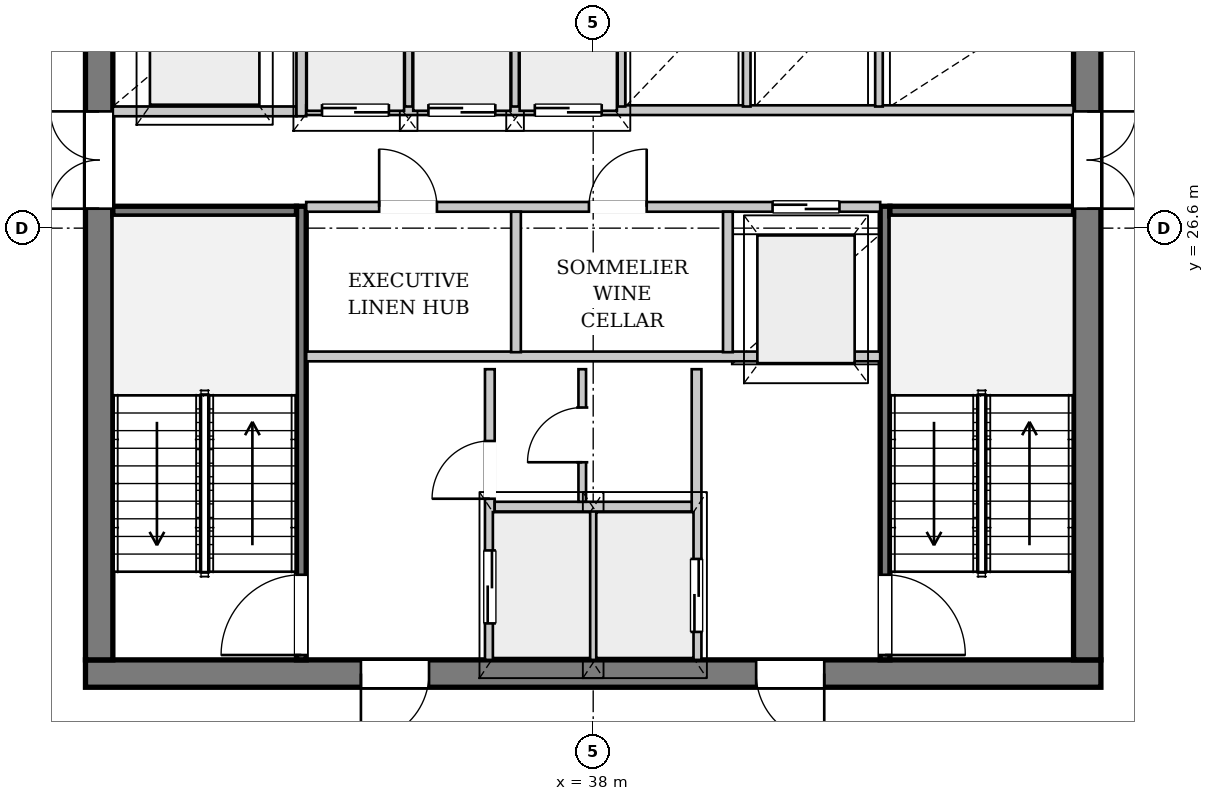
"""IFC4 building model, lengths in metres.
Left out: names, types, materials, properties, quantities, classifications, styles, units other than length and angle.
Written with IfcOpenShell. Run it as: python <this file> out.ifc"""

import sys

from ifc_helpers import new_model, si_unit, direction, frame, frame_2d, origin, place, context, subcontext, project, spatial, rectangle, extrude, source, transform, mapped, element, fill, save


model = new_model("IFC4")
c1 = context("Model", 3, precision=1e-05, world=origin(), true_north=direction((0.0, 1.0)))
c2 = subcontext(c1, "Body", "Model", "MODEL_VIEW")
j1 = project(units=[si_unit("LENGTHUNIT", "METRE"), si_unit("PLANEANGLEUNIT", "RADIAN")], contexts=[c1])
p1 = place(None, origin())
s1 = spatial("IfcSite", under=j1, at=p1, CompositionType="ELEMENT")
p2 = place(p1, origin())
s2 = spatial("IfcBuilding", under=s1, at=p2, CompositionType="ELEMENT")
p3 = place(p2, frame((0.0, 0.0, 230.9)))
s3 = spatial("IfcBuildingStorey", under=s2, at=p3, CompositionType="ELEMENT", Elevation=230.9)
p4 = place(p3, frame((52.708, 24.702, 0.0), z_axis=(0.0, 0.0, 1.0), x_axis=(-0.403169735339, -0.915125217938, 0.0)))
e1 = element("IfcWall", 1, at=p4, inside=s3, PredefinedType="SOLIDWALL", context=c2, shape_type="SweptSolid", body=[
    extrude(rectangle(XDim=22.923, YDim=0.32, at=frame_2d((11.461, 0.0))), origin(), (0.0, 0.0, 1.0), 2.872),
])
p5 = place(p4, frame((7.685, 0.0, 0.0)))
e2 = element("IfcOpeningElement", 2, at=p5, cuts=e1, PredefinedType="OPENING", context=c2, shape_type="SweptSolid", body=[
    extrude(rectangle(XDim=1.5, YDim=2.3, at=frame_2d((0.75, 1.15))), frame((0.0, 0.17, 0.0), z_axis=(0.0, -1.0, 0.0), x_axis=(1.0, 0.0, 0.0)), (0.0, 0.0, 1.0), 0.34),
])
p6 = place(p4, frame((15.663, 0.0, 0.402)))
e3 = element("IfcOpeningElement", 3, at=p6, cuts=e1, PredefinedType="OPENING", context=c2, shape_type="SweptSolid", body=[
    extrude(rectangle(XDim=2.6, YDim=2.35, at=frame_2d((1.3, 1.175))), frame((0.0, 0.17, 0.0), z_axis=(0.0, -1.0, 0.0), x_axis=(1.0, 0.0, 0.0)), (0.0, 0.0, 1.0), 0.34),
])
p7 = place(p3, frame((46.35, 19.275, 0.0), z_axis=(0.0, 0.0, 1.0), x_axis=(-1.0, 0.0, 0.0)))
e4 = element("IfcWall", 4, at=p7, inside=s3, PredefinedType="SHEAR", context=c2, shape_type="SweptSolid", body=[
    extrude(rectangle(XDim=16.7, YDim=0.45, at=frame_2d((8.35, 0.0))), origin(), (0.0, 0.0, 1.0), 3.38),
])
p8 = place(p7, frame((4.55, 0.0, 0.0)))
e5 = element("IfcOpeningElement", 5, at=p8, cuts=e4, PredefinedType="OPENING", context=c2, shape_type="SweptSolid", body=[
    extrude(rectangle(XDim=1.12, YDim=2.25, at=frame_2d((0.56, 1.125))), frame((0.0, 0.235, 0.0), z_axis=(0.0, -1.0, 0.0), x_axis=(1.0, 0.0, 0.0)), (0.0, 0.0, 1.0), 0.47),
])
p9 = place(p7, frame((11.05, 0.0, 0.0)))
e6 = element("IfcOpeningElement", 6, at=p9, cuts=e4, PredefinedType="OPENING", context=c2, shape_type="SweptSolid", body=[
    extrude(rectangle(XDim=1.12, YDim=2.25, at=frame_2d((0.56, 1.125))), frame((0.0, 0.235, 0.0), z_axis=(0.0, -1.0, 0.0), x_axis=(1.0, 0.0, 0.0)), (0.0, 0.0, 1.0), 0.47),
])
p10 = place(p3, frame((29.875, 19.5, 0.0), z_axis=(0.0, 0.0, 1.0), x_axis=(0.0, 1.0, 0.0)))
e7 = element("IfcWall", 7, at=p10, inside=s3, PredefinedType="SHEAR", context=c2, shape_type="SweptSolid", body=[
    extrude(rectangle(XDim=14.2, YDim=0.45, at=frame_2d((7.1, 0.0))), origin(), (0.0, 0.0, 1.0), 3.38),
])
p11 = place(p10, frame((7.42, 0.0, 0.0)))
e8 = element("IfcOpeningElement", 8, at=p11, cuts=e7, PredefinedType="OPENING", context=c2, shape_type="SweptSolid", body=[
    extrude(rectangle(XDim=1.6, YDim=2.2, at=frame_2d((0.8, 1.1))), frame((0.0, 0.235, 0.0), z_axis=(0.0, -1.0, 0.0), x_axis=(1.0, 0.0, 0.0)), (0.0, 0.0, 1.0), 0.47),
])
p12 = place(p3, frame((46.125, 33.7, 0.0), z_axis=(0.0, 0.0, 1.0), x_axis=(0.0, -1.0, 0.0)))
e9 = element("IfcWall", 9, at=p12, inside=s3, PredefinedType="SHEAR", context=c2, shape_type="SweptSolid", body=[
    extrude(rectangle(XDim=14.2, YDim=0.45, at=frame_2d((7.1, 0.0))), origin(), (0.0, 0.0, 1.0), 3.38),
])
p13 = place(p12, frame((5.18, 0.0, 0.0)))
e10 = element("IfcOpeningElement", 10, at=p13, cuts=e9, PredefinedType="OPENING", context=c2, shape_type="SweptSolid", body=[
    extrude(rectangle(XDim=1.6, YDim=2.2, at=frame_2d((0.8, 1.1))), frame((0.0, 0.235, 0.0), z_axis=(0.0, -1.0, 0.0), x_axis=(1.0, 0.0, 0.0)), (0.0, 0.0, 1.0), 0.47),
])
p14 = place(p12, frame((2.05, 0.0, 0.0)))
e11 = element("IfcOpeningElement", 11, at=p14, cuts=e9, PredefinedType="OPENING", context=c2, shape_type="SweptSolid", body=[
    extrude(rectangle(XDim=0.95, YDim=2.1, at=frame_2d((0.475, 1.05))), frame((0.0, 0.235, 0.0), z_axis=(0.0, -1.0, 0.0), x_axis=(1.0, 0.0, 0.0)), (0.0, 0.0, 1.0), 0.47),
])
p15 = place(p3, frame((33.2, 19.5, 0.0), z_axis=(0.0, 0.0, 1.0), x_axis=(0.0, 1.0, 0.0)))
e12 = element("IfcWall", 12, at=p15, inside=s3, PredefinedType="PARTITIONING", context=c2, shape_type="SweptSolid", body=[
    extrude(rectangle(XDim=7.46, YDim=0.16, at=frame_2d((3.73, 0.0))), origin(), (0.0, 0.0, 1.0), 3.38),
])
p16 = place(p15, frame((0.08, 0.0, 0.0)))
e13 = element("IfcOpeningElement", 13, at=p16, cuts=e12, PredefinedType="OPENING", context=c2, shape_type="SweptSolid", body=[
    extrude(rectangle(XDim=1.32, YDim=2.2, at=frame_2d((0.66, 1.1))), frame((0.0, 0.09, 0.0), z_axis=(0.0, -1.0, 0.0), x_axis=(1.0, 0.0, 0.0)), (0.0, 0.0, 1.0), 0.18),
])
p17 = place(p3, frame((30.1, 26.88, 0.0), z_axis=(0.0, 0.0, 1.0), x_axis=(1.0, 0.0, 0.0)))
e14 = element("IfcWall", 14, at=p17, inside=s3, PredefinedType="PARTITIONING", context=c2, shape_type="SweptSolid", body=[
    extrude(rectangle(XDim=3.02, YDim=0.16, at=frame_2d((1.51, 0.0))), origin(), (0.0, 0.0, 1.0), 3.38),
])
p18 = place(p3, frame((42.8, 26.96, 0.0), z_axis=(0.0, 0.0, 1.0), x_axis=(0.0, -1.0, 0.0)))
e15 = element("IfcWall", 15, at=p18, inside=s3, PredefinedType="PARTITIONING", context=c2, shape_type="SweptSolid", body=[
    extrude(rectangle(XDim=7.46, YDim=0.16, at=frame_2d((3.73, 0.0))), origin(), (0.0, 0.0, 1.0), 3.38),
])
p19 = place(p18, frame((6.06, 0.0, 0.0)))
e16 = element("IfcOpeningElement", 16, at=p19, cuts=e15, PredefinedType="OPENING", context=c2, shape_type="SweptSolid", body=[
    extrude(rectangle(XDim=1.32, YDim=2.2, at=frame_2d((0.66, 1.1))), frame((0.0, 0.09, 0.0), z_axis=(0.0, -1.0, 0.0), x_axis=(1.0, 0.0, 0.0)), (0.0, 0.0, 1.0), 0.18),
])
p20 = place(p3, frame((42.88, 26.88, 0.0), z_axis=(0.0, 0.0, 1.0), x_axis=(1.0, 0.0, 0.0)))
e17 = element("IfcWall", 17, at=p20, inside=s3, PredefinedType="PARTITIONING", context=c2, shape_type="SweptSolid", body=[
    extrude(rectangle(XDim=3.02, YDim=0.16, at=frame_2d((1.51, 0.0))), origin(), (0.0, 0.0, 1.0), 3.38),
])
p21 = place(p3, frame((36.3, 19.5, 0.0), z_axis=(0.0, 0.0, 1.0), x_axis=(0.0, 1.0, 0.0)))
e18 = element("IfcWall", 18, at=p21, inside=s3, PredefinedType="PARTITIONING", context=c2, shape_type="SweptSolid", body=[
    extrude(rectangle(XDim=4.78, YDim=0.16, at=frame_2d((2.39, 0.0))), origin(), (0.0, 0.0, 1.0), 3.38),
])
p22 = place(p21, frame((0.6, 0.0, 0.0)))
e19 = element("IfcOpeningElement", 19, at=p22, cuts=e18, PredefinedType="OPENING", context=c2, shape_type="SweptSolid", body=[
    extrude(rectangle(XDim=1.2, YDim=2.2, at=frame_2d((0.6, 1.1))), frame((0.0, 0.09, 0.0), z_axis=(0.0, -1.0, 0.0), x_axis=(1.0, 0.0, 0.0)), (0.0, 0.0, 1.0), 0.18),
])
p23 = place(p21, frame((2.65, 0.0, 0.0)))
e20 = element("IfcOpeningElement", 20, at=p23, cuts=e18, PredefinedType="OPENING", context=c2, shape_type="SweptSolid", body=[
    extrude(rectangle(XDim=0.95, YDim=2.1, at=frame_2d((0.475, 1.05))), frame((0.0, 0.09, 0.0), z_axis=(0.0, -1.0, 0.0), x_axis=(1.0, 0.0, 0.0)), (0.0, 0.0, 1.0), 0.18),
])
p24 = place(p3, frame((39.7, 24.28, 0.0), z_axis=(0.0, 0.0, 1.0), x_axis=(0.0, -1.0, 0.0)))
e21 = element("IfcWall", 21, at=p24, inside=s3, PredefinedType="PARTITIONING", context=c2, shape_type="SweptSolid", body=[
    extrude(rectangle(XDim=4.78, YDim=0.16, at=frame_2d((2.39, 0.0))), origin(), (0.0, 0.0, 1.0), 3.38),
])
p25 = place(p24, frame((3.12, 0.0, 0.0)))
e22 = element("IfcOpeningElement", 22, at=p25, cuts=e21, PredefinedType="OPENING", context=c2, shape_type="SweptSolid", body=[
    extrude(rectangle(XDim=1.2, YDim=2.2, at=frame_2d((0.6, 1.1))), frame((0.0, 0.09, 0.0), z_axis=(0.0, -1.0, 0.0), x_axis=(1.0, 0.0, 0.0)), (0.0, 0.0, 1.0), 0.18),
])
p26 = place(p3, frame((38.0, 19.5, 0.0), z_axis=(0.0, 0.0, 1.0), x_axis=(0.0, 1.0, 0.0)))
e23 = element("IfcWall", 23, at=p26, inside=s3, PredefinedType="PARTITIONING", context=c2, shape_type="SweptSolid", body=[
    extrude(rectangle(XDim=2.46, YDim=0.125, at=frame_2d((1.23, 0.0))), origin(), (0.0, 0.0, 1.0), 3.38),
])
p27 = place(p3, frame((36.38, 22.02, 0.0), z_axis=(0.0, 0.0, 1.0), x_axis=(1.0, 0.0, 0.0)))
e24 = element("IfcWall", 24, at=p27, inside=s3, PredefinedType="PARTITIONING", context=c2, shape_type="SweptSolid", body=[
    extrude(rectangle(XDim=3.24, YDim=0.16, at=frame_2d((1.62, 0.0))), origin(), (0.0, 0.0, 1.0), 3.38),
])
p28 = place(p3, frame((33.28, 24.49, 0.0), z_axis=(0.0, 0.0, 1.0), x_axis=(1.0, 0.0, 0.0)))
e25 = element("IfcWall", 25, at=p28, inside=s3, PredefinedType="PARTITIONING", context=c2, shape_type="SweptSolid", body=[
    extrude(rectangle(XDim=9.44, YDim=0.16, at=frame_2d((4.72, 0.0))), origin(), (0.0, 0.0, 1.0), 3.38),
])
p29 = place(p3, frame((37.82, 22.1, 0.0), z_axis=(0.0, 0.0, 1.0), x_axis=(0.0, 1.0, 0.0)))
e26 = element("IfcWall", 26, at=p29, inside=s3, PredefinedType="PARTITIONING", context=c2, shape_type="SweptSolid", body=[
    extrude(rectangle(XDim=2.18, YDim=0.125, at=frame_2d((1.09, 0.0))), origin(), (0.0, 0.0, 1.0), 3.38),
])
p30 = place(p29, frame((0.65, 0.0, 0.0)))
e27 = element("IfcOpeningElement", 27, at=p30, cuts=e26, PredefinedType="OPENING", context=c2, shape_type="SweptSolid", body=[
    extrude(rectangle(XDim=0.9, YDim=2.1, at=frame_2d((0.45, 1.05))), frame((0.0, 0.073, 0.0), z_axis=(0.0, -1.0, 0.0), x_axis=(1.0, 0.0, 0.0)), (0.0, 0.0, 1.0), 0.145),
])
p31 = place(p3, frame((30.1, 28.52, 0.0), z_axis=(0.0, 0.0, 1.0), x_axis=(1.0, 0.0, 0.0)))
e28 = element("IfcWall", 28, at=p31, inside=s3, PredefinedType="PARTITIONING", context=c2, shape_type="SweptSolid", body=[
    extrude(rectangle(XDim=3.02, YDim=0.16, at=frame_2d((1.51, 0.0))), origin(), (0.0, 0.0, 1.0), 3.38),
])
p32 = place(p3, frame((33.2, 28.44, 0.0), z_axis=(0.0, 0.0, 1.0), x_axis=(0.0, 1.0, 0.0)))
e29 = element("IfcWall", 29, at=p32, inside=s3, PredefinedType="PARTITIONING", context=c2, shape_type="SweptSolid", body=[
    extrude(rectangle(XDim=5.26, YDim=0.16, at=frame_2d((2.63, 0.0))), origin(), (0.0, 0.0, 1.0), 3.38),
])
p33 = place(p3, frame((33.28, 26.95, 0.0), z_axis=(0.0, 0.0, 1.0), x_axis=(1.0, 0.0, 0.0)))
e30 = element("IfcWall", 30, at=p33, inside=s3, PredefinedType="PARTITIONING", context=c2, shape_type="SweptSolid", body=[
    extrude(rectangle(XDim=9.44, YDim=0.16, at=frame_2d((4.72, 0.0))), origin(), (0.0, 0.0, 1.0), 3.38),
])
p34 = place(p33, frame((1.2, 0.0, 0.0)))
e31 = element("IfcOpeningElement", 31, at=p34, cuts=e30, PredefinedType="OPENING", context=c2, shape_type="SweptSolid", body=[
    extrude(rectangle(XDim=0.95, YDim=2.1, at=frame_2d((0.475, 1.05))), frame((0.0, 0.09, 0.0), z_axis=(0.0, -1.0, 0.0), x_axis=(1.0, 0.0, 0.0)), (0.0, 0.0, 1.0), 0.18),
])
p35 = place(p33, frame((4.65, 0.0, 0.0)))
e32 = element("IfcOpeningElement", 32, at=p35, cuts=e30, PredefinedType="OPENING", context=c2, shape_type="SweptSolid", body=[
    extrude(rectangle(XDim=0.95, YDim=2.1, at=frame_2d((0.475, 1.05))), frame((0.0, 0.09, 0.0), z_axis=(0.0, -1.0, 0.0), x_axis=(1.0, 0.0, 0.0)), (0.0, 0.0, 1.0), 0.18),
])
p36 = place(p33, frame((7.67, 0.0, 0.0)))
e33 = element("IfcOpeningElement", 33, at=p36, cuts=e30, PredefinedType="OPENING", context=c2, shape_type="SweptSolid", body=[
    extrude(rectangle(XDim=1.1, YDim=2.2, at=frame_2d((0.55, 1.1))), frame((0.0, 0.09, 0.0), z_axis=(0.0, -1.0, 0.0), x_axis=(1.0, 0.0, 0.0)), (0.0, 0.0, 1.0), 0.18),
])
for number, where, z_axis, x_axis in (
    (34, (36.73, 24.56, 0.0), (0.0, 0.0, 1.0), (0.0, 1.0, 0.0)),
    (35, (40.215, 24.56, 0.0), (0.0, 0.0, 1.0), (0.0, 1.0, 0.0)),
):
    element("IfcWall", number, at=place(p3, frame(where, z_axis=z_axis, x_axis=x_axis)), inside=s3, PredefinedType="PARTITIONING", context=c2, shape_type="SweptSolid", body=[
        extrude(rectangle(XDim=2.31, YDim=0.16, at=frame_2d((1.155, 0.0))), origin(), (0.0, 0.0, 1.0), 3.38),
    ])
p37 = place(p3, frame((33.28, 28.54, 0.0), z_axis=(0.0, 0.0, 1.0), x_axis=(1.0, 0.0, 0.0)))
e36 = element("IfcWall", 36, at=p37, inside=s3, PredefinedType="PARTITIONING", context=c2, shape_type="SweptSolid", body=[
    extrude(rectangle(XDim=12.62, YDim=0.16, at=frame_2d((6.31, 0.0))), origin(), (0.0, 0.0, 1.0), 3.38),
])
p38 = place(p37, frame((0.26, 0.0, 0.0)))
e37 = element("IfcOpeningElement", 37, at=p38, cuts=e36, PredefinedType="OPENING", context=c2, shape_type="SweptSolid", body=[
    extrude(rectangle(XDim=1.1, YDim=2.2, at=frame_2d((0.55, 1.1))), frame((0.0, 0.09, 0.0), z_axis=(0.0, -1.0, 0.0), x_axis=(1.0, 0.0, 0.0)), (0.0, 0.0, 1.0), 0.18),
])
p39 = place(p37, frame((2.01, 0.0, 0.0)))
e38 = element("IfcOpeningElement", 38, at=p39, cuts=e36, PredefinedType="OPENING", context=c2, shape_type="SweptSolid", body=[
    extrude(rectangle(XDim=1.1, YDim=2.2, at=frame_2d((0.55, 1.1))), frame((0.0, 0.09, 0.0), z_axis=(0.0, -1.0, 0.0), x_axis=(1.0, 0.0, 0.0)), (0.0, 0.0, 1.0), 0.18),
])
p40 = place(p37, frame((3.76, 0.0, 0.0)))
e39 = element("IfcOpeningElement", 39, at=p40, cuts=e36, PredefinedType="OPENING", context=c2, shape_type="SweptSolid", body=[
    extrude(rectangle(XDim=1.1, YDim=2.2, at=frame_2d((0.55, 1.1))), frame((0.0, 0.09, 0.0), z_axis=(0.0, -1.0, 0.0), x_axis=(1.0, 0.0, 0.0)), (0.0, 0.0, 1.0), 0.18),
])
for number, where, z_axis, x_axis in (
    (40, (34.965, 28.6, 0.0), (0.0, 0.0, 1.0), (0.0, 1.0, 0.0)),
    (41, (36.715, 28.6, 0.0), (0.0, 0.0, 1.0), (0.0, 1.0, 0.0)),
    (42, (38.465, 28.6, 0.0), (0.0, 0.0, 1.0), (0.0, 1.0, 0.0)),
    (43, (40.525, 28.6, 0.0), (0.0, 0.0, 1.0), (0.0, 1.0, 0.0)),
    (44, (42.7, 28.6, 0.0), (0.0, 0.0, 1.0), (0.0, 1.0, 0.0)),
):
    element("IfcWall", number, at=place(p3, frame(where, z_axis=z_axis, x_axis=x_axis)), inside=s3, PredefinedType="PARTITIONING", context=c2, shape_type="SweptSolid", body=[
        extrude(rectangle(XDim=1.92, YDim=0.125, at=frame_2d((0.96, 0.0))), origin(), (0.0, 0.0, 1.0), 3.38),
    ])
m1 = source(origin(), c2, "Body", "SweptSolid", [
    extrude(rectangle(XDim=1.12, YDim=2.25, at=frame_2d((0.56, 1.125))), frame((0.0, 0.025, 0.0), z_axis=(0.0, -1.0, 0.0), x_axis=(1.0, 0.0, 0.0)), (0.0, 0.0, 1.0), 0.05),
])
p41 = place(p8, origin())
e45 = element("IfcDoor", 45, at=p41, inside=s3, OperationType="SINGLE_SWING_LEFT", PredefinedType="DOOR", context=c2, shape_type="MappedRepresentation", body=[
    mapped(m1, transform((0.0, 0.0, 0.0), x_axis=(1.0, 0.0, 0.0), y_axis=(0.0, 1.0, 0.0), z_axis=(0.0, 0.0, 1.0), scale=1.0)),
])
fill(e5, e45)
p42 = place(p9, origin())
e46 = element("IfcDoor", 46, at=p42, inside=s3, OperationType="SINGLE_SWING_RIGHT", PredefinedType="DOOR", context=c2, shape_type="MappedRepresentation", body=[
    mapped(m1, transform((0.0, 0.0, 0.0), x_axis=(1.0, 0.0, 0.0), y_axis=(0.0, 1.0, 0.0), z_axis=(0.0, 0.0, 1.0), scale=1.0)),
])
fill(e6, e46)
m2 = source(origin(), c2, "Body", "SweptSolid", [
    extrude(rectangle(XDim=1.6, YDim=2.2, at=frame_2d((0.8, 1.1))), frame((0.0, 0.025, 0.0), z_axis=(0.0, -1.0, 0.0), x_axis=(1.0, 0.0, 0.0)), (0.0, 0.0, 1.0), 0.05),
])
p43 = place(p11, origin())
e47 = element("IfcDoor", 47, at=p43, inside=s3, OperationType="DOUBLE_DOOR_SINGLE_SWING", PredefinedType="DOOR", context=c2, shape_type="MappedRepresentation", body=[
    mapped(m2, transform((0.0, 0.0, 0.0), x_axis=(1.0, 0.0, 0.0), y_axis=(0.0, 1.0, 0.0), z_axis=(0.0, 0.0, 1.0), scale=1.0)),
])
fill(e8, e47)
p44 = place(p13, origin())
e48 = element("IfcDoor", 48, at=p44, inside=s3, OperationType="DOUBLE_DOOR_SINGLE_SWING", PredefinedType="DOOR", context=c2, shape_type="MappedRepresentation", body=[
    mapped(m2, transform((0.0, 0.0, 0.0), x_axis=(1.0, 0.0, 0.0), y_axis=(0.0, 1.0, 0.0), z_axis=(0.0, 0.0, 1.0), scale=1.0)),
])
fill(e10, e48)
m3 = source(origin(), c2, "Body", "SweptSolid", [
    extrude(rectangle(XDim=1.32, YDim=2.2, at=frame_2d((0.66, 1.1))), frame((0.0, 0.025, 0.0), z_axis=(0.0, -1.0, 0.0), x_axis=(1.0, 0.0, 0.0)), (0.0, 0.0, 1.0), 0.05),
])
p45 = place(p16, origin())
e49 = element("IfcDoor", 49, at=p45, inside=s3, OperationType="SINGLE_SWING_LEFT", PredefinedType="DOOR", context=c2, shape_type="MappedRepresentation", body=[
    mapped(m3, transform((0.0, 0.0, 0.0), x_axis=(1.0, 0.0, 0.0), y_axis=(0.0, 1.0, 0.0), z_axis=(0.0, 0.0, 1.0), scale=1.0)),
])
fill(e13, e49)
p46 = place(p19, origin())
e50 = element("IfcDoor", 50, at=p46, inside=s3, OperationType="SINGLE_SWING_RIGHT", PredefinedType="DOOR", context=c2, shape_type="MappedRepresentation", body=[
    mapped(m3, transform((0.0, 0.0, 0.0), x_axis=(1.0, 0.0, 0.0), y_axis=(0.0, 1.0, 0.0), z_axis=(0.0, 0.0, 1.0), scale=1.0)),
])
fill(e16, e50)
m4 = source(origin(), c2, "Body", "SweptSolid", [
    extrude(rectangle(XDim=1.2, YDim=2.2, at=frame_2d((0.6, 1.1))), frame((0.0, 0.025, 0.0), z_axis=(0.0, -1.0, 0.0), x_axis=(1.0, 0.0, 0.0)), (0.0, 0.0, 1.0), 0.05),
])
p47 = place(p22, origin())
e51 = element("IfcDoor", 51, at=p47, inside=s3, OperationType="DOUBLE_DOOR_SLIDING", PredefinedType="DOOR", context=c2, shape_type="MappedRepresentation", body=[
    mapped(m4, transform((0.0, 0.0, 0.0), x_axis=(1.0, 0.0, 0.0), y_axis=(0.0, 1.0, 0.0), z_axis=(0.0, 0.0, 1.0), scale=1.0)),
])
fill(e19, e51)
m5 = source(origin(), c2, "Body", "SweptSolid", [
    extrude(rectangle(XDim=0.95, YDim=2.1, at=frame_2d((0.475, 1.05))), frame((0.0, 0.025, 0.0), z_axis=(0.0, -1.0, 0.0), x_axis=(1.0, 0.0, 0.0)), (0.0, 0.0, 1.0), 0.05),
])
p48 = place(p23, origin())
e52 = element("IfcDoor", 52, at=p48, inside=s3, OperationType="SINGLE_SWING_LEFT", PredefinedType="DOOR", context=c2, shape_type="MappedRepresentation", body=[
    mapped(m5, transform((0.0, 0.0, 0.0), x_axis=(1.0, 0.0, 0.0), y_axis=(0.0, 1.0, 0.0), z_axis=(0.0, 0.0, 1.0), scale=1.0)),
])
fill(e20, e52)
m6 = source(origin(), c2, "Body", "SweptSolid", [
    extrude(rectangle(XDim=0.9, YDim=2.1, at=frame_2d((0.45, 1.05))), frame((0.0, 0.025, 0.0), z_axis=(0.0, -1.0, 0.0), x_axis=(1.0, 0.0, 0.0)), (0.0, 0.0, 1.0), 0.05),
])
p49 = place(p30, origin())
e53 = element("IfcDoor", 53, at=p49, inside=s3, OperationType="SINGLE_SWING_LEFT", PredefinedType="DOOR", context=c2, shape_type="MappedRepresentation", body=[
    mapped(m6, transform((0.0, 0.0, 0.0), x_axis=(1.0, 0.0, 0.0), y_axis=(0.0, 1.0, 0.0), z_axis=(0.0, 0.0, 1.0), scale=1.0)),
])
fill(e27, e53)
p50 = place(p25, origin())
e54 = element("IfcDoor", 54, at=p50, inside=s3, OperationType="DOUBLE_DOOR_SLIDING", PredefinedType="DOOR", context=c2, shape_type="MappedRepresentation", body=[
    mapped(m4, transform((0.0, 0.0, 0.0), x_axis=(1.0, 0.0, 0.0), y_axis=(0.0, 1.0, 0.0), z_axis=(0.0, 0.0, 1.0), scale=1.0)),
])
fill(e22, e54)
p51 = place(p34, origin())
e55 = element("IfcDoor", 55, at=p51, inside=s3, OperationType="SINGLE_SWING_LEFT", PredefinedType="DOOR", context=c2, shape_type="MappedRepresentation", body=[
    mapped(m5, transform((0.0, 0.0, 0.0), x_axis=(1.0, 0.0, 0.0), y_axis=(0.0, 1.0, 0.0), z_axis=(0.0, 0.0, 1.0), scale=1.0)),
])
fill(e31, e55)
p52 = place(p35, origin())
e56 = element("IfcDoor", 56, at=p52, inside=s3, OperationType="SINGLE_SWING_RIGHT", PredefinedType="DOOR", context=c2, shape_type="MappedRepresentation", body=[
    mapped(m5, transform((0.0, 0.0, 0.0), x_axis=(1.0, 0.0, 0.0), y_axis=(0.0, 1.0, 0.0), z_axis=(0.0, 0.0, 1.0), scale=1.0)),
])
fill(e32, e56)
m7 = source(origin(), c2, "Body", "SweptSolid", [
    extrude(rectangle(XDim=1.1, YDim=2.2, at=frame_2d((0.55, 1.1))), frame((0.0, 0.025, 0.0), z_axis=(0.0, -1.0, 0.0), x_axis=(1.0, 0.0, 0.0)), (0.0, 0.0, 1.0), 0.05),
])
p53 = place(p36, origin())
e57 = element("IfcDoor", 57, at=p53, inside=s3, OperationType="DOUBLE_DOOR_SLIDING", PredefinedType="DOOR", context=c2, shape_type="MappedRepresentation", body=[
    mapped(m7, transform((0.0, 0.0, 0.0), x_axis=(1.0, 0.0, 0.0), y_axis=(0.0, 1.0, 0.0), z_axis=(0.0, 0.0, 1.0), scale=1.0)),
])
fill(e33, e57)
p54 = place(p38, origin())
e58 = element("IfcDoor", 58, at=p54, inside=s3, OperationType="DOUBLE_DOOR_SLIDING", PredefinedType="DOOR", context=c2, shape_type="MappedRepresentation", body=[
    mapped(m7, transform((0.0, 0.0, 0.0), x_axis=(1.0, 0.0, 0.0), y_axis=(0.0, 1.0, 0.0), z_axis=(0.0, 0.0, 1.0), scale=1.0)),
])
fill(e37, e58)
p55 = place(p39, origin())
e59 = element("IfcDoor", 59, at=p55, inside=s3, OperationType="DOUBLE_DOOR_SLIDING", PredefinedType="DOOR", context=c2, shape_type="MappedRepresentation", body=[
    mapped(m7, transform((0.0, 0.0, 0.0), x_axis=(1.0, 0.0, 0.0), y_axis=(0.0, 1.0, 0.0), z_axis=(0.0, 0.0, 1.0), scale=1.0)),
])
fill(e38, e59)
p56 = place(p40, origin())
e60 = element("IfcDoor", 60, at=p56, inside=s3, OperationType="DOUBLE_DOOR_SLIDING", PredefinedType="DOOR", context=c2, shape_type="MappedRepresentation", body=[
    mapped(m7, transform((0.0, 0.0, 0.0), x_axis=(1.0, 0.0, 0.0), y_axis=(0.0, 1.0, 0.0), z_axis=(0.0, 0.0, 1.0), scale=1.0)),
])
fill(e39, e60)
save(model, sys.argv[1])
